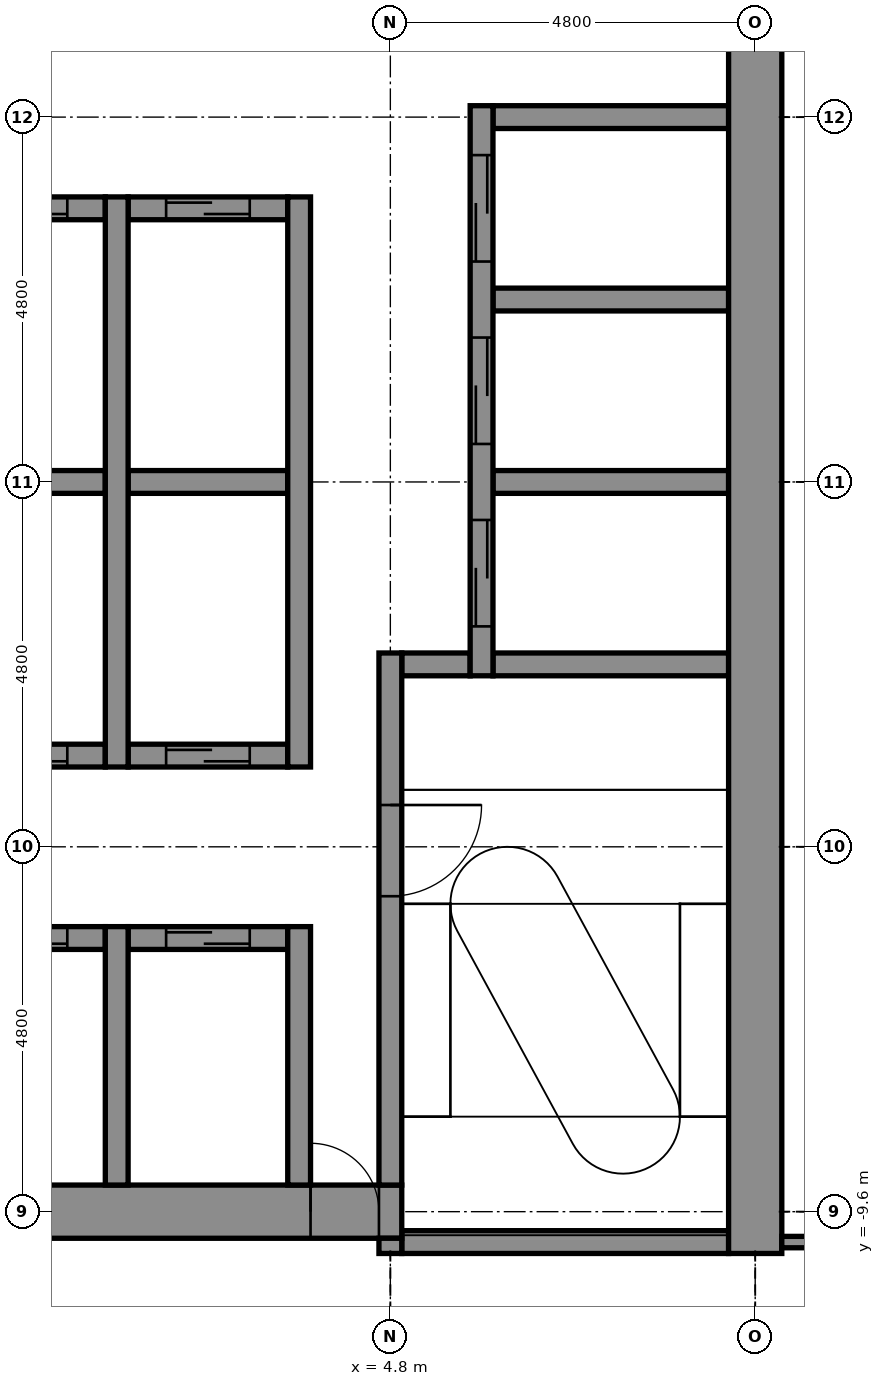
"""IFC4 building model, lengths in metres.
Left out: names, types, materials, properties, quantities, classifications, styles, units other than length and angle.
Written with IfcOpenShell. Run it as: python <this file> out.ifc"""

import sys

from ifc_helpers import new_model, si_unit, direction, frame, frame_2d, origin, place, context, subcontext, project, spatial, rectangle, extrude, element, fill, save


model = new_model("IFC4")
c1 = context("Model", 3, precision=1e-05, world=origin(), true_north=direction((0.0, 1.0)))
c2 = subcontext(c1, "Body", "Model", "MODEL_VIEW")
j1 = project(units=[si_unit("LENGTHUNIT", "METRE"), si_unit("PLANEANGLEUNIT", "RADIAN")], contexts=[c1])
p1 = place(None, origin())
s1 = spatial("IfcSite", under=j1, at=p1, CompositionType="ELEMENT")
p2 = place(p1, origin())
s2 = spatial("IfcBuilding", under=s1, at=p2, CompositionType="ELEMENT")
p3 = place(p2, frame((0.0, 0.0, 185.6)))
s3 = spatial("IfcBuildingStorey", under=s2, at=p3, CompositionType="ELEMENT", Elevation=185.6)
p4 = place(p3, frame((4.95, -10.0, -0.15), z_axis=(0.0, 0.0, 1.0), x_axis=(1.0, 0.0, 0.0)))
e1 = element("IfcWall", 1, at=p4, inside=s3, PredefinedType="STANDARD", context=c2, shape_type="SweptSolid", body=[
    extrude(rectangle(XDim=4.3, YDim=0.3, at=frame_2d((2.15, 0.0))), origin(), (0.0, 0.0, 1.0), 3.9),
])
p5 = place(p3, frame((-5.25, -9.6, -0.15), z_axis=(0.0, 0.0, 1.0), x_axis=(1.0, 0.0, 0.0)))
e2 = element("IfcWall", 2, at=p5, inside=s3, PredefinedType="SHEAR", context=c2, shape_type="SweptSolid", body=[
    extrude(rectangle(XDim=10.2, YDim=0.7, at=frame_2d((5.1, 0.0))), origin(), (0.0, 0.0, 1.0), 3.9),
])
p6 = place(p5, frame((9.0, 0.0, 0.15)))
e3 = element("IfcOpeningElement", 3, at=p6, cuts=e2, PredefinedType="OPENING", context=c2, shape_type="SweptSolid", body=[
    extrude(rectangle(XDim=0.9, YDim=2.1, at=frame_2d((0.45, 1.05))), frame((0.0, 0.36, 0.0), z_axis=(0.0, -1.0, 0.0), x_axis=(1.0, 0.0, 0.0)), (0.0, 0.0, 1.0), 0.72),
])
p7 = place(p3, frame((-1.05, -6.0, -0.15), z_axis=(0.0, 0.0, 1.0), x_axis=(1.0, 0.0, 0.0)))
e4 = element("IfcWall", 4, at=p7, inside=s3, PredefinedType="STANDARD", context=c2, shape_type="SweptSolid", body=[
    extrude(rectangle(XDim=2.1, YDim=0.3, at=frame_2d((1.05, 0.0))), origin(), (0.0, 0.0, 1.0), 3.9),
])
p8 = place(p7, frame((0.5, 0.0, 0.15)))
e5 = element("IfcOpeningElement", 5, at=p8, cuts=e4, PredefinedType="OPENING", context=c2, shape_type="SweptSolid", body=[
    extrude(rectangle(XDim=1.1, YDim=2.1, at=frame_2d((0.55, 1.05))), frame((0.0, 0.16, 0.0), z_axis=(0.0, -1.0, 0.0), x_axis=(1.0, 0.0, 0.0)), (0.0, 0.0, 1.0), 0.32),
])
p9 = place(p3, frame((1.35, -6.0, -0.15), z_axis=(0.0, 0.0, 1.0), x_axis=(1.0, 0.0, 0.0)))
e6 = element("IfcWall", 6, at=p9, inside=s3, PredefinedType="STANDARD", context=c2, shape_type="SweptSolid", body=[
    extrude(rectangle(XDim=2.1, YDim=0.3, at=frame_2d((1.05, 0.0))), origin(), (0.0, 0.0, 1.0), 3.9),
])
p10 = place(p9, frame((0.5, 0.0, 0.15)))
e7 = element("IfcOpeningElement", 7, at=p10, cuts=e6, PredefinedType="OPENING", context=c2, shape_type="SweptSolid", body=[
    extrude(rectangle(XDim=1.1, YDim=2.1, at=frame_2d((0.55, 1.05))), frame((0.0, 0.16, 0.0), z_axis=(0.0, -1.0, 0.0), x_axis=(1.0, 0.0, 0.0)), (0.0, 0.0, 1.0), 0.32),
])
p11 = place(p3, frame((-1.05, -3.6, -0.15), z_axis=(0.0, 0.0, 1.0), x_axis=(1.0, 0.0, 0.0)))
e8 = element("IfcWall", 8, at=p11, inside=s3, PredefinedType="STANDARD", context=c2, shape_type="SweptSolid", body=[
    extrude(rectangle(XDim=2.1, YDim=0.3, at=frame_2d((1.05, 0.0))), origin(), (0.0, 0.0, 1.0), 3.9),
])
p12 = place(p11, frame((0.5, 0.0, 0.15)))
e9 = element("IfcOpeningElement", 9, at=p12, cuts=e8, PredefinedType="OPENING", context=c2, shape_type="SweptSolid", body=[
    extrude(rectangle(XDim=1.1, YDim=2.1, at=frame_2d((0.55, 1.05))), frame((0.0, 0.16, 0.0), z_axis=(0.0, -1.0, 0.0), x_axis=(1.0, 0.0, 0.0)), (0.0, 0.0, 1.0), 0.32),
])
p13 = place(p3, frame((1.35, -3.6, -0.15), z_axis=(0.0, 0.0, 1.0), x_axis=(1.0, 0.0, 0.0)))
e10 = element("IfcWall", 10, at=p13, inside=s3, PredefinedType="STANDARD", context=c2, shape_type="SweptSolid", body=[
    extrude(rectangle(XDim=2.1, YDim=0.3, at=frame_2d((1.05, 0.0))), origin(), (0.0, 0.0, 1.0), 3.9),
])
p14 = place(p13, frame((0.5, 0.0, 0.15)))
e11 = element("IfcOpeningElement", 11, at=p14, cuts=e10, PredefinedType="OPENING", context=c2, shape_type="SweptSolid", body=[
    extrude(rectangle(XDim=1.1, YDim=2.1, at=frame_2d((0.55, 1.05))), frame((0.0, 0.16, 0.0), z_axis=(0.0, -1.0, 0.0), x_axis=(1.0, 0.0, 0.0)), (0.0, 0.0, 1.0), 0.32),
])
p15 = place(p3, frame((4.95, -2.4, -0.15), z_axis=(0.0, 0.0, 1.0), x_axis=(1.0, 0.0, 0.0)))
e12 = element("IfcWall", 12, at=p15, inside=s3, PredefinedType="STANDARD", context=c2, shape_type="SweptSolid", body=[
    extrude(rectangle(XDim=0.9, YDim=0.3, at=frame_2d((0.45, 0.0))), origin(), (0.0, 0.0, 1.0), 3.9),
])
p16 = place(p3, frame((6.15, -2.4, -0.15), z_axis=(0.0, 0.0, 1.0), x_axis=(1.0, 0.0, 0.0)))
e13 = element("IfcWall", 13, at=p16, inside=s3, PredefinedType="STANDARD", context=c2, shape_type="SweptSolid", body=[
    extrude(rectangle(XDim=3.1, YDim=0.3, at=frame_2d((1.55, 0.0))), origin(), (0.0, 0.0, 1.0), 3.9),
])
p17 = place(p3, frame((-1.05, 0.0, -0.15), z_axis=(0.0, 0.0, 1.0), x_axis=(1.0, 0.0, 0.0)))
e14 = element("IfcWall", 14, at=p17, inside=s3, PredefinedType="STANDARD", context=c2, shape_type="SweptSolid", body=[
    extrude(rectangle(XDim=2.1, YDim=0.3, at=frame_2d((1.05, 0.0))), origin(), (0.0, 0.0, 1.0), 3.9),
])
p18 = place(p3, frame((1.35, 0.0, -0.15), z_axis=(0.0, 0.0, 1.0), x_axis=(1.0, 0.0, 0.0)))
e15 = element("IfcWall", 15, at=p18, inside=s3, PredefinedType="STANDARD", context=c2, shape_type="SweptSolid", body=[
    extrude(rectangle(XDim=2.1, YDim=0.3, at=frame_2d((1.05, 0.0))), origin(), (0.0, 0.0, 1.0), 3.9),
])
for number, where, z_axis, x_axis in (
    (16, (6.15, 0.0, -0.15), (0.0, 0.0, 1.0), (1.0, 0.0, 0.0)),
    (17, (6.15, 2.4, -0.15), (0.0, 0.0, 1.0), (1.0, 0.0, 0.0)),
):
    element("IfcWall", number, at=place(p3, frame(where, z_axis=z_axis, x_axis=x_axis)), inside=s3, PredefinedType="STANDARD", context=c2, shape_type="SweptSolid", body=[
        extrude(rectangle(XDim=3.1, YDim=0.3, at=frame_2d((1.55, 0.0))), origin(), (0.0, 0.0, 1.0), 3.9),
    ])
p19 = place(p3, frame((-1.05, 3.6, -0.15), z_axis=(0.0, 0.0, 1.0), x_axis=(1.0, 0.0, 0.0)))
e18 = element("IfcWall", 18, at=p19, inside=s3, PredefinedType="STANDARD", context=c2, shape_type="SweptSolid", body=[
    extrude(rectangle(XDim=2.1, YDim=0.3, at=frame_2d((1.05, 0.0))), origin(), (0.0, 0.0, 1.0), 3.9),
])
p20 = place(p19, frame((0.5, 0.0, 0.15)))
e19 = element("IfcOpeningElement", 19, at=p20, cuts=e18, PredefinedType="OPENING", context=c2, shape_type="SweptSolid", body=[
    extrude(rectangle(XDim=1.1, YDim=2.1, at=frame_2d((0.55, 1.05))), frame((0.0, 0.16, 0.0), z_axis=(0.0, -1.0, 0.0), x_axis=(1.0, 0.0, 0.0)), (0.0, 0.0, 1.0), 0.32),
])
p21 = place(p3, frame((1.35, 3.6, -0.15), z_axis=(0.0, 0.0, 1.0), x_axis=(1.0, 0.0, 0.0)))
e20 = element("IfcWall", 20, at=p21, inside=s3, PredefinedType="STANDARD", context=c2, shape_type="SweptSolid", body=[
    extrude(rectangle(XDim=2.1, YDim=0.3, at=frame_2d((1.05, 0.0))), origin(), (0.0, 0.0, 1.0), 3.9),
])
p22 = place(p21, frame((0.5, 0.0, 0.15)))
e21 = element("IfcOpeningElement", 21, at=p22, cuts=e20, PredefinedType="OPENING", context=c2, shape_type="SweptSolid", body=[
    extrude(rectangle(XDim=1.1, YDim=2.1, at=frame_2d((0.55, 1.05))), frame((0.0, 0.16, 0.0), z_axis=(0.0, -1.0, 0.0), x_axis=(1.0, 0.0, 0.0)), (0.0, 0.0, 1.0), 0.32),
])
p23 = place(p3, frame((6.15, 4.8, -0.15), z_axis=(0.0, 0.0, 1.0), x_axis=(1.0, 0.0, 0.0)))
e22 = element("IfcWall", 22, at=p23, inside=s3, PredefinedType="STANDARD", context=c2, shape_type="SweptSolid", body=[
    extrude(rectangle(XDim=3.1, YDim=0.3, at=frame_2d((1.55, 0.0))), origin(), (0.0, 0.0, 1.0), 3.9),
])
p24 = place(p3, frame((1.2, -9.25, -0.15), z_axis=(0.0, 0.0, 1.0), x_axis=(0.0, 1.0, 0.0)))
e23 = element("IfcWall", 23, at=p24, inside=s3, PredefinedType="STANDARD", context=c2, shape_type="SweptSolid", body=[
    extrude(rectangle(XDim=3.4, YDim=0.3, at=frame_2d((1.7, 0.0))), origin(), (0.0, 0.0, 1.0), 3.9),
])
p25 = place(p3, frame((1.2, -3.75, -0.15), z_axis=(0.0, 0.0, 1.0), x_axis=(0.0, 1.0, 0.0)))
e24 = element("IfcWall", 24, at=p25, inside=s3, PredefinedType="STANDARD", context=c2, shape_type="SweptSolid", body=[
    extrude(rectangle(XDim=7.5, YDim=0.3, at=frame_2d((3.75, 0.0))), origin(), (0.0, 0.0, 1.0), 3.9),
])
p26 = place(p3, frame((3.6, -9.25, -0.15), z_axis=(0.0, 0.0, 1.0), x_axis=(0.0, 1.0, 0.0)))
e25 = element("IfcWall", 25, at=p26, inside=s3, PredefinedType="STANDARD", context=c2, shape_type="SweptSolid", body=[
    extrude(rectangle(XDim=3.4, YDim=0.3, at=frame_2d((1.7, 0.0))), origin(), (0.0, 0.0, 1.0), 3.9),
])
p27 = place(p3, frame((3.6, -3.75, -0.15), z_axis=(0.0, 0.0, 1.0), x_axis=(0.0, 1.0, 0.0)))
e26 = element("IfcWall", 26, at=p27, inside=s3, PredefinedType="STANDARD", context=c2, shape_type="SweptSolid", body=[
    extrude(rectangle(XDim=7.5, YDim=0.3, at=frame_2d((3.75, 0.0))), origin(), (0.0, 0.0, 1.0), 3.9),
])
p28 = place(p3, frame((4.8, -10.15, -0.15), z_axis=(0.0, 0.0, 1.0), x_axis=(0.0, 1.0, 0.0)))
e27 = element("IfcWall", 27, at=p28, inside=s3, PredefinedType="STANDARD", context=c2, shape_type="SweptSolid", body=[
    extrude(rectangle(XDim=0.2, YDim=0.3, at=frame_2d((0.1, 0.0))), origin(), (0.0, 0.0, 1.0), 3.9),
])
p29 = place(p3, frame((4.8, -9.25, -0.15), z_axis=(0.0, 0.0, 1.0), x_axis=(0.0, 1.0, 0.0)))
e28 = element("IfcWall", 28, at=p29, inside=s3, PredefinedType="STANDARD", context=c2, shape_type="SweptSolid", body=[
    extrude(rectangle(XDim=7.0, YDim=0.3, at=frame_2d((3.5, 0.0))), origin(), (0.0, 0.0, 1.0), 3.9),
])
p30 = place(p29, frame((3.8, 0.0, 0.15)))
e29 = element("IfcOpeningElement", 29, at=p30, cuts=e28, PredefinedType="OPENING", context=c2, shape_type="SweptSolid", body=[
    extrude(rectangle(XDim=1.2, YDim=2.1, at=frame_2d((0.6, 1.05))), frame((0.0, 0.16, 0.0), z_axis=(0.0, -1.0, 0.0), x_axis=(1.0, 0.0, 0.0)), (0.0, 0.0, 1.0), 0.32),
])
p31 = place(p3, frame((6.0, -2.55, -0.15), z_axis=(0.0, 0.0, 1.0), x_axis=(0.0, 1.0, 0.0)))
e30 = element("IfcWall", 30, at=p31, inside=s3, PredefinedType="STANDARD", context=c2, shape_type="SweptSolid", body=[
    extrude(rectangle(XDim=7.5, YDim=0.3, at=frame_2d((3.75, 0.0))), origin(), (0.0, 0.0, 1.0), 3.9),
])
p32 = place(p31, frame((0.65, 0.0, 0.15)))
e31 = element("IfcOpeningElement", 31, at=p32, cuts=e30, PredefinedType="OPENING", context=c2, shape_type="SweptSolid", body=[
    extrude(rectangle(XDim=1.4, YDim=2.1, at=frame_2d((0.7, 1.05))), frame((0.0, 0.16, 0.0), z_axis=(0.0, -1.0, 0.0), x_axis=(1.0, 0.0, 0.0)), (0.0, 0.0, 1.0), 0.32),
])
p33 = place(p31, frame((3.05, 0.0, 0.15)))
e32 = element("IfcOpeningElement", 32, at=p33, cuts=e30, PredefinedType="OPENING", context=c2, shape_type="SweptSolid", body=[
    extrude(rectangle(XDim=1.4, YDim=2.1, at=frame_2d((0.7, 1.05))), frame((0.0, 0.16, 0.0), z_axis=(0.0, -1.0, 0.0), x_axis=(1.0, 0.0, 0.0)), (0.0, 0.0, 1.0), 0.32),
])
p34 = place(p31, frame((5.45, 0.0, 0.15)))
e33 = element("IfcOpeningElement", 33, at=p34, cuts=e30, PredefinedType="OPENING", context=c2, shape_type="SweptSolid", body=[
    extrude(rectangle(XDim=1.4, YDim=2.1, at=frame_2d((0.7, 1.05))), frame((0.0, 0.16, 0.0), z_axis=(0.0, -1.0, 0.0), x_axis=(1.0, 0.0, 0.0)), (0.0, 0.0, 1.0), 0.32),
])
p35 = place(p3, frame((9.6, -10.15, -0.15), z_axis=(0.0, 0.0, 1.0), x_axis=(0.0, 1.0, 0.0)))
e34 = element("IfcWall", 34, at=p35, inside=s3, PredefinedType="SHEAR", context=c2, shape_type="SweptSolid", body=[
    extrude(rectangle(XDim=20.1, YDim=0.7, at=frame_2d((10.05, 0.0))), origin(), (0.0, 0.0, 1.0), 3.9),
])
p36 = place(p3, frame((9.95, -10.0, 0.0), z_axis=(0.0, 0.0, 1.0), x_axis=(1.0, 0.0, 0.0)))
e35 = element("IfcWall", 35, at=p36, inside=s3, PredefinedType="PARTITIONING", context=c2, shape_type="SweptSolid", body=[
    extrude(rectangle(XDim=9.405, YDim=0.15, at=frame_2d((4.702, 0.0))), origin(), (0.0, 0.0, 1.0), 3.75),
])
p37 = place(p36, frame((2.925, 0.0, 0.0)))
e36 = element("IfcOpeningElement", 36, at=p37, cuts=e35, PredefinedType="OPENING", context=c2, shape_type="SweptSolid", body=[
    extrude(rectangle(XDim=1.0, YDim=2.1, at=frame_2d((0.5, 1.05))), frame((0.0, 0.085, 0.0), z_axis=(0.0, -1.0, 0.0), x_axis=(1.0, 0.0, 0.0)), (0.0, 0.0, 1.0), 0.17),
])
p38 = place(p36, frame((6.816, 0.0, 0.0)))
e37 = element("IfcOpeningElement", 37, at=p38, cuts=e35, PredefinedType="OPENING", context=c2, shape_type="SweptSolid", body=[
    extrude(rectangle(XDim=1.8, YDim=2.1, at=frame_2d((0.9, 1.05))), frame((0.0, 0.085, 0.0), z_axis=(0.0, -1.0, 0.0), x_axis=(1.0, 0.0, 0.0)), (0.0, 0.0, 1.0), 0.17),
])
p39 = place(p32, origin())
e38 = element("IfcDoor", 38, at=p39, inside=s3, OperationType="DOUBLE_DOOR_SLIDING", PredefinedType="DOOR", context=c2, shape_type="SweptSolid", body=[
    extrude(rectangle(XDim=1.4, YDim=2.1, at=frame_2d((0.7, 1.05))), frame((0.0, 0.025, 0.0), z_axis=(0.0, -1.0, 0.0), x_axis=(1.0, 0.0, 0.0)), (0.0, 0.0, 1.0), 0.05),
])
fill(e31, e38)
p40 = place(p33, origin())
e39 = element("IfcDoor", 39, at=p40, inside=s3, OperationType="DOUBLE_DOOR_SLIDING", PredefinedType="DOOR", context=c2, shape_type="SweptSolid", body=[
    extrude(rectangle(XDim=1.4, YDim=2.1, at=frame_2d((0.7, 1.05))), frame((0.0, 0.025, 0.0), z_axis=(0.0, -1.0, 0.0), x_axis=(1.0, 0.0, 0.0)), (0.0, 0.0, 1.0), 0.05),
])
fill(e32, e39)
p41 = place(p34, origin())
e40 = element("IfcDoor", 40, at=p41, inside=s3, OperationType="DOUBLE_DOOR_SLIDING", PredefinedType="DOOR", context=c2, shape_type="SweptSolid", body=[
    extrude(rectangle(XDim=1.4, YDim=2.1, at=frame_2d((0.7, 1.05))), frame((0.0, 0.025, 0.0), z_axis=(0.0, -1.0, 0.0), x_axis=(1.0, 0.0, 0.0)), (0.0, 0.0, 1.0), 0.05),
])
fill(e33, e40)
p42 = place(p20, origin())
e41 = element("IfcDoor", 41, at=p42, inside=s3, OperationType="DOUBLE_DOOR_SLIDING", PredefinedType="DOOR", context=c2, shape_type="SweptSolid", body=[
    extrude(rectangle(XDim=1.1, YDim=2.1, at=frame_2d((0.55, 1.05))), frame((0.0, 0.025, 0.0), z_axis=(0.0, -1.0, 0.0), x_axis=(1.0, 0.0, 0.0)), (0.0, 0.0, 1.0), 0.05),
])
fill(e19, e41)
p43 = place(p22, origin())
e42 = element("IfcDoor", 42, at=p43, inside=s3, OperationType="DOUBLE_DOOR_SLIDING", PredefinedType="DOOR", context=c2, shape_type="SweptSolid", body=[
    extrude(rectangle(XDim=1.1, YDim=2.1, at=frame_2d((0.55, 1.05))), frame((0.0, 0.025, 0.0), z_axis=(0.0, -1.0, 0.0), x_axis=(1.0, 0.0, 0.0)), (0.0, 0.0, 1.0), 0.05),
])
fill(e21, e42)
p44 = place(p12, origin())
e43 = element("IfcDoor", 43, at=p44, inside=s3, OperationType="DOUBLE_DOOR_SLIDING", PredefinedType="DOOR", context=c2, shape_type="SweptSolid", body=[
    extrude(rectangle(XDim=1.1, YDim=2.1, at=frame_2d((0.55, 1.05))), frame((0.0, 0.025, 0.0), z_axis=(0.0, -1.0, 0.0), x_axis=(1.0, 0.0, 0.0)), (0.0, 0.0, 1.0), 0.05),
])
fill(e9, e43)
p45 = place(p14, origin())
e44 = element("IfcDoor", 44, at=p45, inside=s3, OperationType="DOUBLE_DOOR_SLIDING", PredefinedType="DOOR", context=c2, shape_type="SweptSolid", body=[
    extrude(rectangle(XDim=1.1, YDim=2.1, at=frame_2d((0.55, 1.05))), frame((0.0, 0.025, 0.0), z_axis=(0.0, -1.0, 0.0), x_axis=(1.0, 0.0, 0.0)), (0.0, 0.0, 1.0), 0.05),
])
fill(e11, e44)
p46 = place(p8, origin())
e45 = element("IfcDoor", 45, at=p46, inside=s3, OperationType="DOUBLE_DOOR_SLIDING", PredefinedType="DOOR", context=c2, shape_type="SweptSolid", body=[
    extrude(rectangle(XDim=1.1, YDim=2.1, at=frame_2d((0.55, 1.05))), frame((0.0, 0.025, 0.0), z_axis=(0.0, -1.0, 0.0), x_axis=(1.0, 0.0, 0.0)), (0.0, 0.0, 1.0), 0.05),
])
fill(e5, e45)
p47 = place(p10, origin())
e46 = element("IfcDoor", 46, at=p47, inside=s3, OperationType="DOUBLE_DOOR_SLIDING", PredefinedType="DOOR", context=c2, shape_type="SweptSolid", body=[
    extrude(rectangle(XDim=1.1, YDim=2.1, at=frame_2d((0.55, 1.05))), frame((0.0, 0.025, 0.0), z_axis=(0.0, -1.0, 0.0), x_axis=(1.0, 0.0, 0.0)), (0.0, 0.0, 1.0), 0.05),
])
fill(e7, e46)
p48 = place(p30, frame((1.2, 0.0, 0.0), z_axis=(0.0, 0.0, 1.0), x_axis=(-1.0, 0.0, 0.0)))
e47 = element("IfcDoor", 47, at=p48, inside=s3, OperationType="SINGLE_SWING_RIGHT", PredefinedType="DOOR", context=c2, shape_type="SweptSolid", body=[
    extrude(rectangle(XDim=1.2, YDim=2.1, at=frame_2d((0.6, 1.05))), frame((0.0, 0.025, 0.0), z_axis=(0.0, -1.0, 0.0), x_axis=(1.0, 0.0, 0.0)), (0.0, 0.0, 1.0), 0.05),
])
fill(e29, e47)
p49 = place(p6, origin())
e48 = element("IfcDoor", 48, at=p49, inside=s3, OperationType="SINGLE_SWING_LEFT", PredefinedType="DOOR", context=c2, shape_type="SweptSolid", body=[
    extrude(rectangle(XDim=0.9, YDim=2.1, at=frame_2d((0.45, 1.05))), frame((0.0, 0.025, 0.0), z_axis=(0.0, -1.0, 0.0), x_axis=(1.0, 0.0, 0.0)), (0.0, 0.0, 1.0), 0.05),
])
fill(e3, e48)
save(model, sys.argv[1])
